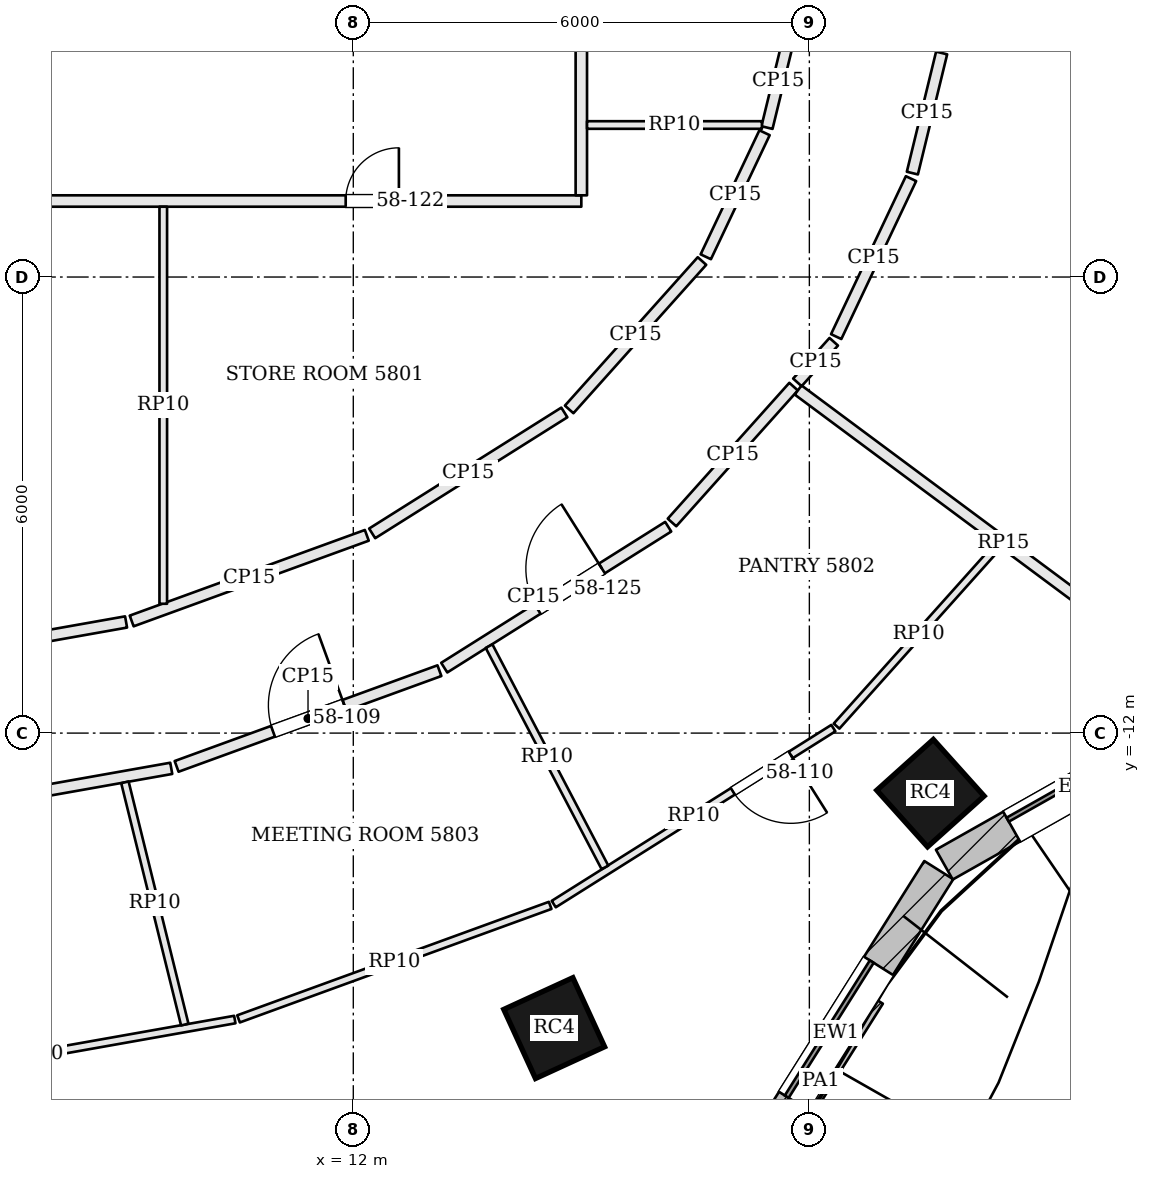
"""IFC4 building model, lengths in metres.
Left out: names, types, materials, properties, quantities, classifications, styles, units other than length and angle.
Written with IfcOpenShell. Run it as: python <this file> out.ifc"""

import sys

from ifc_helpers import new_model, si_unit, direction, frame, frame_2d, origin, origin_2d, place, context, subcontext, project, spatial, rectangle, extrude, element, fill, save


model = new_model("IFC4")
c1 = context("Model", 3, precision=1e-05, world=origin(), true_north=direction((0.0, 1.0)))
c2 = subcontext(c1, "Body", "Model", "MODEL_VIEW")
j1 = project(units=[si_unit("LENGTHUNIT", "METRE"), si_unit("PLANEANGLEUNIT", "RADIAN")], contexts=[c1])
p1 = place(None, origin())
s1 = spatial("IfcSite", under=j1, at=p1, CompositionType="ELEMENT")
p2 = place(p1, origin())
s2 = spatial("IfcBuilding", under=s1, at=p2, CompositionType="ELEMENT")
p3 = place(p2, frame((0.0, 0.0, 237.0)))
s3 = spatial("IfcBuildingStorey", under=s2, at=p3, CompositionType="ELEMENT", Elevation=237.0)
for number, where, z_axis, x_axis in (
    (1, (14.643, -15.881, 0.0), (0.0, 0.0, 1.0), (0.909, 0.417, 0.0)),
    (2, (19.593, -12.79, 0.0), (0.0, 0.0, 1.0), (0.744, 0.668, 0.0)),
):
    element("IfcColumn", number, at=place(p3, frame(where, z_axis=z_axis, x_axis=x_axis)), inside=s3, PredefinedType="COLUMN", context=c2, shape_type="SweptSolid", body=[
        extrude(rectangle(XDim=1.0, YDim=1.0, at=origin_2d()), origin(), (0.0, 0.0, 1.0), 3.9),
    ])
p4 = place(p3, frame((16.998, -18.099, 0.0), z_axis=(0.0, 0.0, 1.0), x_axis=(0.532745661304, 0.846275404559, 0.0)))
e3 = element("IfcWall", 3, at=p4, inside=s3, PredefinedType="SOLIDWALL", context=c2, shape_type="SweptSolid", body=[
    extrude(rectangle(XDim=5.076, YDim=0.45, at=frame_2d((2.538, 0.0))), origin(), (0.0, 0.0, 1.0), 3.7),
])
p5 = place(p4, frame((1.488, 0.0, 0.9)))
e4 = element("IfcOpeningElement", 4, at=p5, cuts=e3, PredefinedType="OPENING", context=c2, shape_type="SweptSolid", body=[
    extrude(rectangle(XDim=2.1, YDim=2.3, at=frame_2d((1.05, 1.15))), frame((0.0, 0.235, 0.0), z_axis=(0.0, -1.0, 0.0), x_axis=(1.0, 0.0, 0.0)), (0.0, 0.0, 1.0), 0.47),
])
p6 = place(p3, frame((19.776, -13.731, 0.0), z_axis=(0.0, 0.0, 1.0), x_axis=(0.870610133829, 0.491973571318, 0.0)))
e5 = element("IfcWall", 5, at=p6, inside=s3, PredefinedType="SOLIDWALL", context=c2, shape_type="SweptSolid", body=[
    extrude(rectangle(XDim=4.134, YDim=0.45, at=frame_2d((2.067, 0.0))), origin(), (0.0, 0.0, 1.0), 3.7),
])
p7 = place(p6, frame((1.017, 0.0, 0.9)))
e6 = element("IfcOpeningElement", 6, at=p7, cuts=e5, PredefinedType="OPENING", context=c2, shape_type="SweptSolid", body=[
    extrude(rectangle(XDim=2.1, YDim=2.3, at=frame_2d((1.05, 1.15))), frame((0.0, 0.235, 0.0), z_axis=(0.0, -1.0, 0.0), x_axis=(1.0, 0.0, 0.0)), (0.0, 0.0, 1.0), 0.47),
])
p8 = place(p3, frame((17.466, -17.664, 3.9), z_axis=(0.0, 0.0, 1.0), x_axis=(0.532743008157, 0.846277074758, 0.0)))
e7 = element("IfcWall", 7, at=p8, inside=s3, PredefinedType="PARAPET", context=c2, shape_type="SweptSolid", body=[
    extrude(rectangle(XDim=2.581, YDim=0.3, at=frame_2d((1.29, 0.0))), origin(), (0.0, 0.0, 1.0), 1.1),
])
p9 = place(p3, frame((4.995, -13.281, 0.0), z_axis=(0.0, 0.0, 1.0), x_axis=(0.98463411377, 0.174630071865, 0.0)))
e8 = element("IfcWall", 8, at=p9, inside=s3, PredefinedType="PARTITIONING", context=c2, shape_type="SweptSolid", body=[
    extrude(rectangle(XDim=4.682, YDim=0.15, at=frame_2d((2.341, 0.0))), origin(), (0.0, 0.0, 1.0), 3.084),
])
p10 = place(p3, frame((9.676, -12.438, 0.0), z_axis=(0.0, 0.0, 1.0), x_axis=(0.939640289748, 0.342163887461, 0.0)))
e9 = element("IfcWall", 9, at=p10, inside=s3, PredefinedType="PARTITIONING", context=c2, shape_type="SweptSolid", body=[
    extrude(rectangle(XDim=3.68, YDim=0.15, at=frame_2d((1.84, 0.0))), origin(), (0.0, 0.0, 1.0), 3.084),
])
p11 = place(p10, frame((1.349, 0.0, 0.0)))
e10 = element("IfcOpeningElement", 10, at=p11, cuts=e9, PredefinedType="OPENING", context=c2, shape_type="SweptSolid", body=[
    extrude(rectangle(XDim=1.0, YDim=2.4, at=frame_2d((0.5, 1.2))), frame((0.0, 0.085, 0.0), z_axis=(0.0, -1.0, 0.0), x_axis=(1.0, 0.0, 0.0)), (0.0, 0.0, 1.0), 0.17),
])
p12 = place(p3, frame((13.197, -11.139, 0.0), z_axis=(0.0, 0.0, 1.0), x_axis=(0.846390903833, 0.532562144644, 0.0)))
e11 = element("IfcWall", 11, at=p12, inside=s3, PredefinedType="PARTITIONING", context=c2, shape_type="SweptSolid", body=[
    extrude(rectangle(XDim=3.481, YDim=0.15, at=frame_2d((1.741, 0.0))), origin(), (0.0, 0.0, 1.0), 3.084),
])
p13 = place(p12, frame((1.45, 0.0, 0.0)))
e12 = element("IfcOpeningElement", 12, at=p13, cuts=e11, PredefinedType="OPENING", context=c2, shape_type="SweptSolid", body=[
    extrude(rectangle(XDim=1.0, YDim=2.1, at=frame_2d((0.5, 1.05))), frame((0.0, 0.085, 0.0), z_axis=(0.0, -1.0, 0.0), x_axis=(1.0, 0.0, 0.0)), (0.0, 0.0, 1.0), 0.17),
])
p14 = place(p3, frame((16.193, -9.229, 0.0), z_axis=(0.0, 0.0, 1.0), x_axis=(0.666881148698, 0.745164098378, 0.0)))
e13 = element("IfcWall", 13, at=p14, inside=s3, PredefinedType="PARTITIONING", context=c2, shape_type="SweptSolid", body=[
    extrude(rectangle(XDim=2.398, YDim=0.15, at=frame_2d((1.199, 0.0))), origin(), (0.0, 0.0, 1.0), 3.084),
])
p15 = place(p3, frame((23.256, -11.501, 0.0), z_axis=(0.0, 0.0, 1.0), x_axis=(-0.802690272164, 0.596396115826, 0.0)))
e14 = element("IfcWall", 14, at=p15, inside=s3, PredefinedType="PARTITIONING", context=c2, shape_type="SweptSolid", body=[
    extrude(rectangle(XDim=6.731, YDim=0.15, at=frame_2d((3.366, 0.0))), origin(), (0.0, 0.0, 1.0), 3.184),
])
p16 = place(p3, frame((17.843, -7.386, 0.0), z_axis=(0.0, 0.0, 1.0), x_axis=(0.66687446058, 0.745170083824, 0.0)))
e15 = element("IfcWall", 15, at=p16, inside=s3, PredefinedType="PARTITIONING", context=c2, shape_type="SweptSolid", body=[
    extrude(rectangle(XDim=0.717, YDim=0.15, at=frame_2d((0.359, 0.0))), origin(), (0.0, 0.0, 1.0), 3.084),
])
p17 = place(p3, frame((18.353, -6.784, 0.0), z_axis=(0.0, 0.0, 1.0), x_axis=(0.428086344739, 0.903737838894, 0.0)))
e16 = element("IfcWall", 16, at=p17, inside=s3, PredefinedType="PARTITIONING", context=c2, shape_type="SweptSolid", body=[
    extrude(rectangle(XDim=2.3, YDim=0.15, at=frame_2d((1.15, 0.0))), origin(), (0.0, 0.0, 1.0), 3.084),
])
p18 = place(p3, frame((19.355, -4.633, 0.0), z_axis=(0.0, 0.0, 1.0), x_axis=(0.236703930685, 0.971581828359, 0.0)))
e17 = element("IfcWall", 17, at=p18, inside=s3, PredefinedType="PARTITIONING", context=c2, shape_type="SweptSolid", body=[
    extrude(rectangle(XDim=1.626, YDim=0.15, at=frame_2d((0.813, 0.0))), origin(), (0.0, 0.0, 1.0), 3.084),
])
p19 = place(p3, frame((17.739, -2.818, 0.0), z_axis=(0.0, 0.0, 1.0), x_axis=(-0.236884307907, -0.971537865792, 0.0)))
e18 = element("IfcWall", 18, at=p19, inside=s3, PredefinedType="PARTITIONING", context=c2, shape_type="SweptSolid", body=[
    extrude(rectangle(XDim=1.251, YDim=0.15, at=frame_2d((0.625, 0.0))), origin(), (0.0, 0.0, 1.0), 3.084),
])
p20 = place(p3, frame((17.41, -4.102, 0.0), z_axis=(0.0, 0.0, 1.0), x_axis=(-0.428074720318, -0.903743345107, 0.0)))
e19 = element("IfcWall", 19, at=p20, inside=s3, PredefinedType="PARTITIONING", context=c2, shape_type="SweptSolid", body=[
    extrude(rectangle(XDim=1.806, YDim=0.15, at=frame_2d((0.903, 0.0))), origin(), (0.0, 0.0, 1.0), 3.084),
])
p21 = place(p3, frame((16.587, -5.789, 0.0), z_axis=(0.0, 0.0, 1.0), x_axis=(-0.666887460656, -0.745158449472, 0.0)))
e20 = element("IfcWall", 20, at=p21, inside=s3, PredefinedType="PARTITIONING", context=c2, shape_type="SweptSolid", body=[
    extrude(rectangle(XDim=2.62, YDim=0.15, at=frame_2d((1.31, 0.0))), origin(), (0.0, 0.0, 1.0), 3.084),
])
p22 = place(p3, frame((14.777, -7.781, 0.0), z_axis=(0.0, 0.0, 1.0), x_axis=(-0.846359741043, -0.532611667862, 0.0)))
e21 = element("IfcWall", 21, at=p22, inside=s3, PredefinedType="PARTITIONING", context=c2, shape_type="SweptSolid", body=[
    extrude(rectangle(XDim=2.987, YDim=0.15, at=frame_2d((1.494, 0.0))), origin(), (0.0, 0.0, 1.0), 3.084),
])
p23 = place(p3, frame((12.178, -9.398, 0.0), z_axis=(0.0, 0.0, 1.0), x_axis=(-0.939609240084, -0.342249143093, 0.0)))
e22 = element("IfcWall", 22, at=p23, inside=s3, PredefinedType="PARTITIONING", context=c2, shape_type="SweptSolid", body=[
    extrude(rectangle(XDim=3.292, YDim=0.15, at=frame_2d((1.646, 0.0))), origin(), (0.0, 0.0, 1.0), 3.084),
])
p24 = place(p3, frame((9.01, -10.538, 0.0), z_axis=(0.0, 0.0, 1.0), x_axis=(-0.984645638575, -0.174565077936, 0.0)))
e23 = element("IfcWall", 23, at=p24, inside=s3, PredefinedType="PARTITIONING", context=c2, shape_type="SweptSolid", body=[
    extrude(rectangle(XDim=4.358, YDim=0.15, at=frame_2d((2.179, 0.0))), origin(), (0.0, 0.0, 1.0), 3.084),
])
p25 = place(p3, frame((-14.925, -5.0, 0.0), z_axis=(0.0, 0.0, 1.0), x_axis=(1.0, 0.0, 0.0)))
e24 = element("IfcWall", 24, at=p25, inside=s3, PredefinedType="PARTITIONING", context=c2, shape_type="SweptSolid", body=[
    extrude(rectangle(XDim=29.925, YDim=0.15, at=frame_2d((14.962, 0.0))), origin(), (0.0, 0.0, 1.0), 3.084),
])
p26 = place(p25, frame((2.175, 0.0, 0.0)))
e25 = element("IfcOpeningElement", 25, at=p26, cuts=e24, PredefinedType="OPENING", context=c2, shape_type="SweptSolid", body=[
    extrude(rectangle(XDim=1.0, YDim=2.4, at=frame_2d((0.5, 1.2))), frame((0.0, 0.085, 0.0), z_axis=(0.0, -1.0, 0.0), x_axis=(1.0, 0.0, 0.0)), (0.0, 0.0, 1.0), 0.17),
])
p27 = place(p25, frame((14.025, 0.0, 0.0)))
e26 = element("IfcOpeningElement", 26, at=p27, cuts=e24, PredefinedType="OPENING", context=c2, shape_type="SweptSolid", body=[
    extrude(rectangle(XDim=1.8, YDim=2.1, at=frame_2d((0.9, 1.05))), frame((0.0, 0.085, 0.0), z_axis=(0.0, -1.0, 0.0), x_axis=(1.0, 0.0, 0.0)), (0.0, 0.0, 1.0), 0.17),
])
p28 = place(p25, frame((26.825, 0.0, 0.0)))
e27 = element("IfcOpeningElement", 27, at=p28, cuts=e24, PredefinedType="OPENING", context=c2, shape_type="SweptSolid", body=[
    extrude(rectangle(XDim=0.7, YDim=2.1, at=frame_2d((0.35, 1.05))), frame((0.0, 0.085, 0.0), z_axis=(0.0, -1.0, 0.0), x_axis=(1.0, 0.0, 0.0)), (0.0, 0.0, 1.0), 0.17),
])
p29 = place(p3, frame((15.0, -4.925, 0.0), z_axis=(0.0, 0.0, 1.0), x_axis=(0.0, 1.0, 0.0)))
e28 = element("IfcWall", 28, at=p29, inside=s3, PredefinedType="PARTITIONING", context=c2, shape_type="SweptSolid", body=[
    extrude(rectangle(XDim=12.583, YDim=0.15, at=frame_2d((6.292, 0.0))), origin(), (0.0, 0.0, 1.0), 3.084),
])
p30 = place(p29, frame((6.291, 0.0, 0.0)))
e29 = element("IfcOpeningElement", 29, at=p30, cuts=e28, PredefinedType="OPENING", context=c2, shape_type="SweptSolid", body=[
    extrude(rectangle(XDim=1.0, YDim=2.1, at=frame_2d((0.5, 1.05))), frame((0.0, 0.085, 0.0), z_axis=(0.0, -1.0, 0.0), x_axis=(1.0, 0.0, 0.0)), (0.0, 0.0, 1.0), 0.17),
])
p31 = place(p3, frame((20.52, -9.493, 0.0), z_axis=(0.0, 0.0, 1.0), x_axis=(-0.666893929929, -0.745152659677, 0.0)))
e30 = element("IfcWall", 30, at=p31, inside=s3, PredefinedType="PARTITIONING", context=c2, shape_type="SweptSolid", body=[
    extrude(rectangle(XDim=3.241, YDim=0.1, at=frame_2d((1.621, 0.0))), origin(), (0.0, 0.0, 1.0), 3.084),
])
p32 = place(p3, frame((18.316, -11.935, 0.0), z_axis=(0.0, 0.0, 1.0), x_axis=(-0.84637539713, -0.532586788358, 0.0)))
e31 = element("IfcWall", 31, at=p32, inside=s3, PredefinedType="PARTITIONING", context=c2, shape_type="SweptSolid", body=[
    extrude(rectangle(XDim=4.346, YDim=0.1, at=frame_2d((2.173, 0.0))), origin(), (0.0, 0.0, 1.0), 3.084),
])
p33 = place(p32, frame((0.662, 0.0, 0.0)))
e32 = element("IfcOpeningElement", 32, at=p33, cuts=e31, PredefinedType="OPENING", context=c2, shape_type="SweptSolid", body=[
    extrude(rectangle(XDim=0.9, YDim=2.1, at=frame_2d((0.45, 1.05))), frame((0.0, 0.06, 0.0), z_axis=(0.0, -1.0, 0.0), x_axis=(1.0, 0.0, 0.0)), (0.0, 0.0, 1.0), 0.12),
])
p34 = place(p3, frame((14.59, -14.267, 0.0), z_axis=(0.0, 0.0, 1.0), x_axis=(-0.939623405418, -0.342210251148, 0.0)))
e33 = element("IfcWall", 33, at=p34, inside=s3, PredefinedType="PARTITIONING", context=c2, shape_type="SweptSolid", body=[
    extrude(rectangle(XDim=4.363, YDim=0.1, at=frame_2d((2.182, 0.0))), origin(), (0.0, 0.0, 1.0), 3.084),
])
p35 = place(p3, frame((10.441, -15.769, 0.0), z_axis=(0.0, 0.0, 1.0), x_axis=(-0.984642067447, -0.174585219919, 0.0)))
e34 = element("IfcWall", 34, at=p35, inside=s3, PredefinedType="PARTITIONING", context=c2, shape_type="SweptSolid", body=[
    extrude(rectangle(XDim=5.258, YDim=0.1, at=frame_2d((2.629, 0.0))), origin(), (0.0, 0.0, 1.0), 3.084),
])
p36 = place(p3, frame((8.995, -12.648, 0.0), z_axis=(0.0, 0.0, 1.0), x_axis=(0.239839908092, -0.970812452787, 0.0)))
e35 = element("IfcWall", 35, at=p36, inside=s3, PredefinedType="PARTITIONING", context=c2, shape_type="SweptSolid", body=[
    extrude(rectangle(XDim=3.283, YDim=0.1, at=frame_2d((1.641, 0.0))), origin(), (0.0, 0.0, 1.0), 3.084),
])
p37 = place(p3, frame((13.786, -10.856, 0.0), z_axis=(0.0, 0.0, 1.0), x_axis=(0.464015323866, -0.885827172318, 0.0)))
e36 = element("IfcWall", 36, at=p37, inside=s3, PredefinedType="PARTITIONING", context=c2, shape_type="SweptSolid", body=[
    extrude(rectangle(XDim=3.286, YDim=0.1, at=frame_2d((1.643, 0.0))), origin(), (0.0, 0.0, 1.0), 3.084),
])
p38 = place(p3, frame((9.5, -10.299, 0.0), z_axis=(0.0, 0.0, 1.0), x_axis=(0.0, 1.0, 0.0)))
e37 = element("IfcWall", 37, at=p38, inside=s3, PredefinedType="PARTITIONING", context=c2, shape_type="SweptSolid", body=[
    extrude(rectangle(XDim=5.224, YDim=0.1, at=frame_2d((2.612, 0.0))), origin(), (0.0, 0.0, 1.0), 3.084),
])
p39 = place(p3, frame((15.075, -4.0, 0.0), z_axis=(0.0, 0.0, 1.0), x_axis=(1.0, 0.0, 0.0)))
e38 = element("IfcWall", 38, at=p39, inside=s3, PredefinedType="PARTITIONING", context=c2, shape_type="SweptSolid", body=[
    extrude(rectangle(XDim=2.301, YDim=0.1, at=frame_2d((1.15, 0.0))), origin(), (0.0, 0.0, 1.0), 3.084),
])
p40 = place(p5, origin())
e39 = element("IfcWindow", 39, at=p40, inside=s3, PartitioningType="SINGLE_PANEL", PredefinedType="WINDOW", context=c2, shape_type="SweptSolid", body=[
    extrude(rectangle(XDim=2.1, YDim=2.3, at=frame_2d((1.05, 1.15))), frame((0.0, 0.135, 0.0), z_axis=(0.0, -1.0, 0.0), x_axis=(1.0, 0.0, 0.0)), (0.0, 0.0, 1.0), 0.06),
])
fill(e4, e39)
p41 = place(p7, origin())
e40 = element("IfcWindow", 40, at=p41, inside=s3, PartitioningType="SINGLE_PANEL", PredefinedType="WINDOW", context=c2, shape_type="SweptSolid", body=[
    extrude(rectangle(XDim=2.1, YDim=2.3, at=frame_2d((1.05, 1.15))), frame((0.0, 0.135, 0.0), z_axis=(0.0, -1.0, 0.0), x_axis=(1.0, 0.0, 0.0)), (0.0, 0.0, 1.0), 0.06),
])
fill(e6, e40)
p42 = place(p11, origin())
e41 = element("IfcDoor", 41, at=p42, inside=s3, OperationType="SINGLE_SWING_RIGHT", PredefinedType="DOOR", context=c2, shape_type="SweptSolid", body=[
    extrude(rectangle(XDim=1.0, YDim=2.4, at=frame_2d((0.5, 1.2))), frame((0.0, 0.025, 0.0), z_axis=(0.0, -1.0, 0.0), x_axis=(1.0, 0.0, 0.0)), (0.0, 0.0, 1.0), 0.05),
])
fill(e10, e41)
p43 = place(p33, origin())
e42 = element("IfcDoor", 42, at=p43, inside=s3, OperationType="SINGLE_SWING_LEFT", PredefinedType="DOOR", context=c2, shape_type="SweptSolid", body=[
    extrude(rectangle(XDim=0.9, YDim=2.1, at=frame_2d((0.45, 1.05))), frame((0.0, 0.025, 0.0), z_axis=(0.0, -1.0, 0.0), x_axis=(1.0, 0.0, 0.0)), (0.0, 0.0, 1.0), 0.05),
])
fill(e32, e42)
p44 = place(p28, origin())
e43 = element("IfcDoor", 43, at=p44, inside=s3, OperationType="SINGLE_SWING_RIGHT", PredefinedType="DOOR", context=c2, shape_type="SweptSolid", body=[
    extrude(rectangle(XDim=0.7, YDim=2.1, at=frame_2d((0.35, 1.05))), frame((0.0, 0.025, 0.0), z_axis=(0.0, -1.0, 0.0), x_axis=(1.0, 0.0, 0.0)), (0.0, 0.0, 1.0), 0.05),
])
fill(e27, e43)
p45 = place(p13, origin())
e44 = element("IfcDoor", 44, at=p45, inside=s3, OperationType="SINGLE_SWING_RIGHT", PredefinedType="DOOR", context=c2, shape_type="SweptSolid", body=[
    extrude(rectangle(XDim=1.0, YDim=2.1, at=frame_2d((0.5, 1.05))), frame((0.0, 0.025, 0.0), z_axis=(0.0, -1.0, 0.0), x_axis=(1.0, 0.0, 0.0)), (0.0, 0.0, 1.0), 0.05),
])
fill(e12, e44)
save(model, sys.argv[1])
